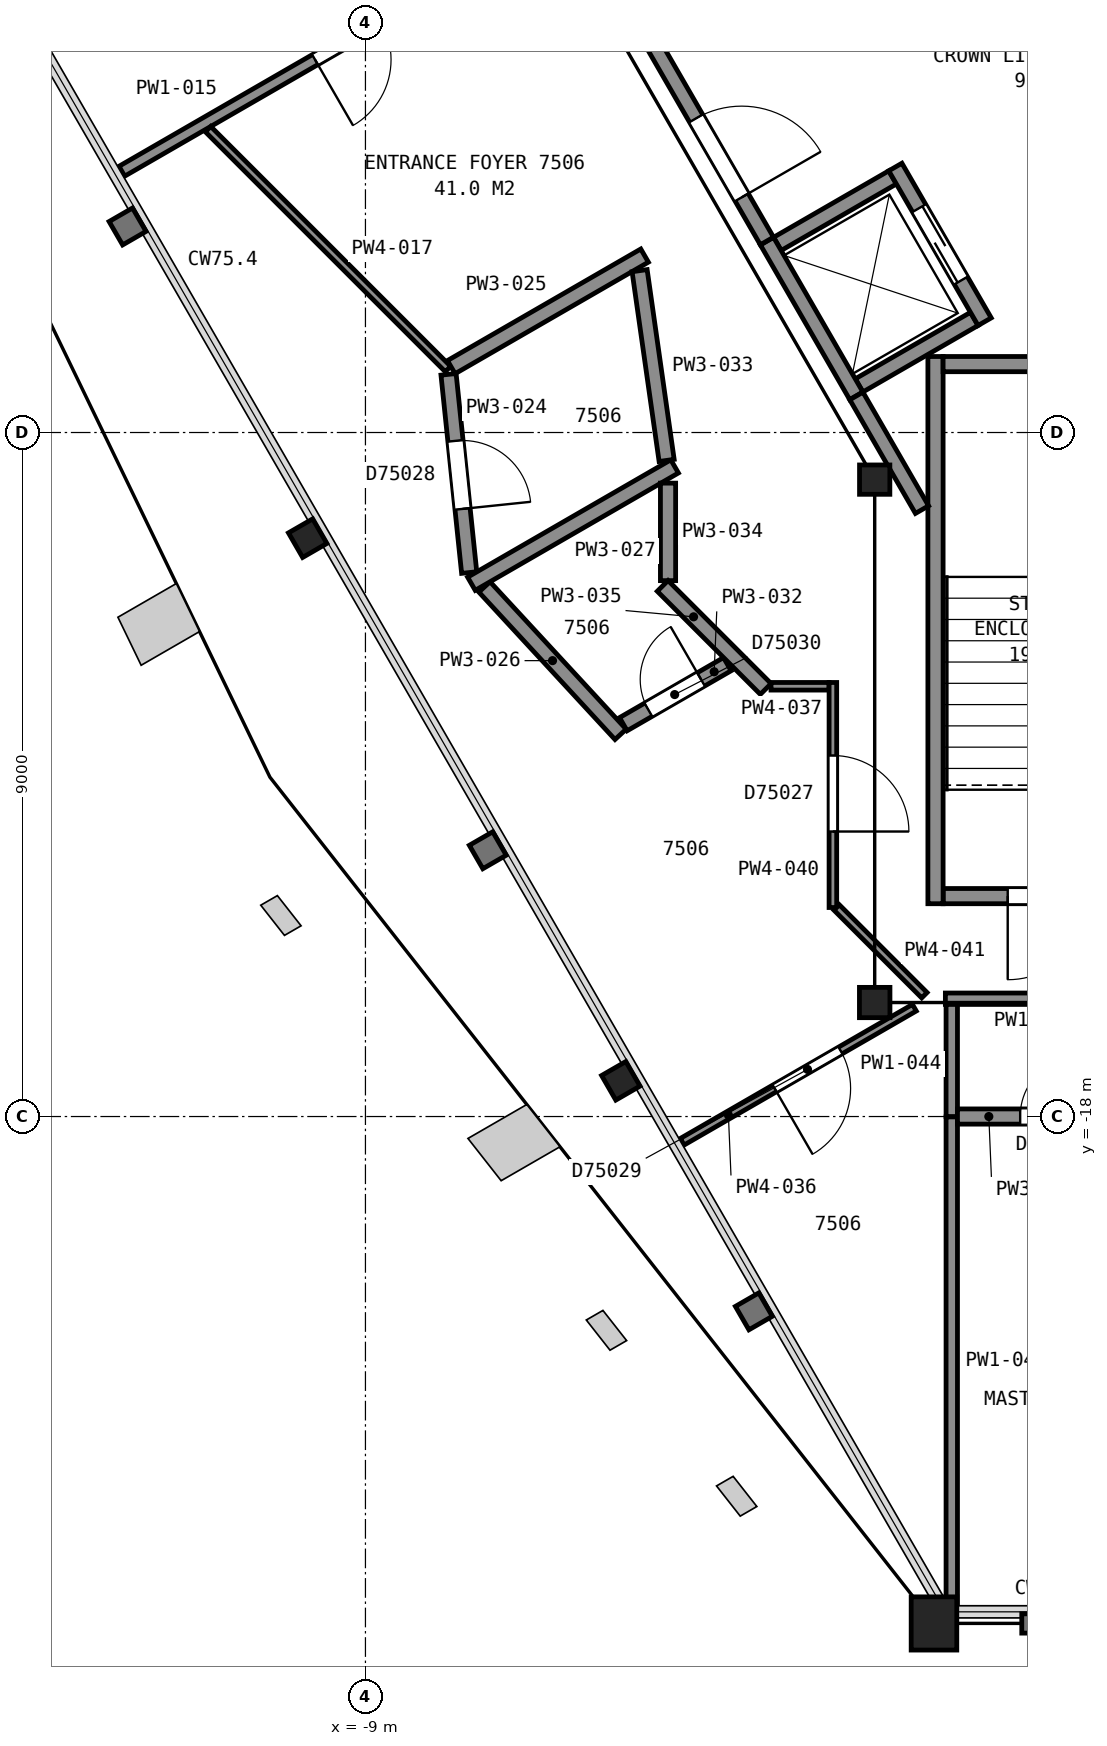
"""IFC4 building model, lengths in metres.
Left out: names, types, materials, properties, quantities, classifications, styles, units other than length and angle.
Written with IfcOpenShell. Run it as: python <this file> out.ifc"""

import sys

from ifc_helpers import new_model, si_unit, direction, frame, frame_2d, origin, origin_2d, place, context, subcontext, project, spatial, rectangle, hollow_rectangle, i_section, extrude, element, fill, save


model = new_model("IFC4")
c1 = context("Model", 3, precision=1e-05, world=origin(), true_north=direction((0.0, 1.0)))
c2 = subcontext(c1, "Body", "Model", "MODEL_VIEW")
j1 = project(units=[si_unit("LENGTHUNIT", "METRE"), si_unit("PLANEANGLEUNIT", "RADIAN")], contexts=[c1])
p1 = place(None, origin())
s1 = spatial("IfcSite", under=j1, at=p1, CompositionType="ELEMENT")
p2 = place(p1, origin())
s2 = spatial("IfcBuilding", under=s1, at=p2, CompositionType="ELEMENT")
p3 = place(p2, frame((0.0, 0.0, 297.3)))
s3 = spatial("IfcBuildingStorey", under=s2, at=p3, CompositionType="ELEMENT", Elevation=297.3)
for number, where, z_axis, x_axis in (
    (1, (-9.76, -10.39, 0.0), (0.0, 0.0, 1.0), (-0.5, 0.866, 0.0)),
    (2, (-5.64, -17.53, 0.0), (0.0, 0.0, 1.0), (-0.5, 0.866, 0.0)),
):
    element("IfcColumn", number, at=place(p3, frame(where, z_axis=z_axis, x_axis=x_axis)), inside=s3, PredefinedType="COLUMN", context=c2, shape_type="SweptSolid", body=[
        extrude(i_section(OverallWidth=0.373, OverallDepth=0.368, WebThickness=0.015, FlangeThickness=0.024, FilletRadius=0.015, at=origin_2d()), origin(), (0.0, 0.0, 1.0), 3.7),
    ])
p4 = place(p3, frame((-1.52, -24.67, 0.0), z_axis=(0.0, 0.0, 1.0), x_axis=(-1.0, 0.0, 0.0)))
e3 = element("IfcColumn", 3, at=p4, inside=s3, PredefinedType="COLUMN", context=c2, shape_type="SweptSolid", body=[
    extrude(hollow_rectangle(XDim=0.6, YDim=0.7, WallThickness=0.04, at=origin_2d()), origin(), (0.0, 0.0, 1.0), 3.7),
])
p5 = place(p3, frame((-2.3, -9.62, 0.0), z_axis=(0.0, 0.0, 1.0), x_axis=(1.0, 0.0, 0.0)))
e4 = element("IfcColumn", 4, at=p5, inside=s3, PredefinedType="COLUMN", context=c2, shape_type="SweptSolid", body=[
    extrude(i_section(OverallWidth=0.399, OverallDepth=0.386, WebThickness=0.021, FlangeThickness=0.033, FilletRadius=0.015, at=origin_2d()), origin(), (0.0, 0.0, 1.0), 3.7),
])
p6 = place(p3, frame((-2.3, -16.5, 0.0), z_axis=(0.0, 0.0, 1.0), x_axis=(-1.0, 0.0, 0.0)))
e5 = element("IfcColumn", 5, at=p6, inside=s3, PredefinedType="COLUMN", context=c2, shape_type="SweptSolid", body=[
    extrude(i_section(OverallWidth=0.401, OverallDepth=0.399, WebThickness=0.025, FlangeThickness=0.04, FilletRadius=0.015, at=origin_2d()), origin(), (0.0, 0.0, 1.0), 3.7),
])
p7 = place(p3, frame((-1.4, -15.1, 0.0), z_axis=(0.0, 0.0, 1.0), x_axis=(1.0, 0.0, 0.0)))
e6 = element("IfcWall", 6, at=p7, inside=s3, PredefinedType="PARTITIONING", context=c2, shape_type="SweptSolid", body=[
    extrude(rectangle(XDim=2.8, YDim=0.2, at=frame_2d((1.4, 0.0))), origin(), (0.0, 0.0, 1.0), 3.45),
])
p8 = place(p7, frame((0.85, 0.0, 0.0)))
e7 = element("IfcOpeningElement", 7, at=p8, cuts=e6, PredefinedType="OPENING", context=c2, shape_type="SweptSolid", body=[
    extrude(rectangle(XDim=1.1, YDim=2.1, at=frame_2d((0.55, 1.05))), frame((0.0, 0.11, 0.0), z_axis=(0.0, -1.0, 0.0), x_axis=(1.0, 0.0, 0.0)), (0.0, 0.0, 1.0), 0.22),
])
p9 = place(p3, frame((-1.5, -8.0, 0.0), z_axis=(0.0, 0.0, 1.0), x_axis=(0.0, -1.0, 0.0)))
e8 = element("IfcWall", 8, at=p9, inside=s3, PredefinedType="PARTITIONING", context=c2, shape_type="SweptSolid", body=[
    extrude(rectangle(XDim=7.2, YDim=0.2, at=frame_2d((3.6, 0.0))), origin(), (0.0, 0.0, 1.0), 3.45),
])
p10 = place(p3, frame((-1.4, -8.1, 0.0), z_axis=(0.0, 0.0, 1.0), x_axis=(1.0, 0.0, 0.0)))
e9 = element("IfcWall", 9, at=p10, inside=s3, PredefinedType="PARTITIONING", context=c2, shape_type="SweptSolid", body=[
    extrude(rectangle(XDim=2.8, YDim=0.2, at=frame_2d((1.4, 0.0))), origin(), (0.0, 0.0, 1.0), 3.45),
])
for number, where, z_axis, x_axis in (
    (10, (-2.505, -8.38, 0.0), (0.0, 0.0, 1.0), (0.866, 0.5, 0.0)),
    (11, (-3.58, -6.519, 0.0), (0.0, 0.0, 1.0), (0.866, 0.5, 0.0)),
):
    element("IfcWall", number, at=place(p3, frame(where, z_axis=z_axis, x_axis=x_axis)), inside=s3, PredefinedType="PARTITIONING", context=c2, shape_type="SweptSolid", body=[
        extrude(rectangle(XDim=1.75, YDim=0.2, at=frame_2d((0.875, 0.0))), origin(), (0.0, 0.0, 1.0), 3.7),
    ])
p11 = place(p3, frame((-0.853, -7.542, 0.0), z_axis=(0.0, 0.0, 1.0), x_axis=(-0.500016218704, 0.866016039709, 0.0)))
e12 = element("IfcWall", 12, at=p11, inside=s3, PredefinedType="PARTITIONING", context=c2, shape_type="SweptSolid", body=[
    extrude(rectangle(XDim=2.35, YDim=0.2, at=frame_2d((1.175, 0.0))), origin(), (0.0, 0.0, 1.0), 3.7),
])
p12 = place(p11, frame((0.625, 0.0, 0.0)))
e13 = element("IfcOpeningElement", 13, at=p12, cuts=e12, PredefinedType="OPENING", context=c2, shape_type="SweptSolid", body=[
    extrude(rectangle(XDim=1.1, YDim=2.1, at=frame_2d((0.55, 1.05))), frame((0.0, 0.11, 0.0), z_axis=(0.0, -1.0, 0.0), x_axis=(1.0, 0.0, 0.0)), (0.0, 0.0, 1.0), 0.22),
])
p13 = place(p3, frame((-2.542, -8.517, 0.0), z_axis=(0.0, 0.0, 1.0), x_axis=(-0.500016218704, 0.866016039709, 0.0)))
e14 = element("IfcWall", 14, at=p13, inside=s3, PredefinedType="PARTITIONING", context=c2, shape_type="SweptSolid", body=[
    extrude(rectangle(XDim=2.35, YDim=0.2, at=frame_2d((1.175, 0.0))), origin(), (0.0, 0.0, 1.0), 3.7),
])
p14 = place(p3, frame((-7.141, -0.551, 0.0), z_axis=(0.0, 0.0, 1.0), x_axis=(0.500001302854, -0.86602465158, 0.0)))
e15 = element("IfcWall", 15, at=p14, inside=s3, PredefinedType="PARTITIONING", context=c2, shape_type="SweptSolid", body=[
    extrude(rectangle(XDim=6.846, YDim=0.2, at=frame_2d((3.423, 0.0))), origin(), (0.0, 0.0, 1.0), 3.45),
])
p15 = place(p14, frame((4.983, 0.0, 0.0)))
e16 = element("IfcOpeningElement", 16, at=p15, cuts=e15, PredefinedType="OPENING", context=c2, shape_type="SweptSolid", body=[
    extrude(rectangle(XDim=1.2, YDim=2.1, at=frame_2d((0.6, 1.05))), frame((0.0, 0.11, 0.0), z_axis=(0.0, -1.0, 0.0), x_axis=(1.0, 0.0, 0.0)), (0.0, 0.0, 1.0), 0.22),
])
p16 = place(p3, frame((-2.541, -8.519, 0.0), z_axis=(0.0, 0.0, 1.0), x_axis=(0.500016142392, -0.86601608377, 0.0)))
e17 = element("IfcWall", 17, at=p16, inside=s3, PredefinedType="PARTITIONING", context=c2, shape_type="SweptSolid", body=[
    extrude(rectangle(XDim=1.727, YDim=0.2, at=frame_2d((0.864, 0.0))), origin(), (0.0, 0.0, 1.0), 3.45),
])
p17 = place(p3, frame((-12.205, -5.562, 0.0), z_axis=(0.0, 0.0, 1.0), x_axis=(0.866006351856, 0.500032997455, 0.0)))
e18 = element("IfcWall", 18, at=p17, inside=s3, PredefinedType="PARTITIONING", context=c2, shape_type="SweptSolid", body=[
    extrude(rectangle(XDim=5.671, YDim=0.15, at=frame_2d((2.835, 0.0))), origin(), (0.0, 0.0, 1.0), 2.723),
])
p18 = place(p17, frame((2.935, 0.0, 0.0)))
e19 = element("IfcOpeningElement", 19, at=p18, cuts=e18, PredefinedType="OPENING", context=c2, shape_type="SweptSolid", body=[
    extrude(rectangle(XDim=1.0, YDim=2.1, at=frame_2d((0.5, 1.05))), frame((0.0, 0.085, 0.0), z_axis=(0.0, -1.0, 0.0), x_axis=(1.0, 0.0, 0.0)), (0.0, 0.0, 1.0), 0.17),
])
p19 = place(p3, frame((-11.071, -5.008, 0.0), z_axis=(0.0, 0.0, 1.0), x_axis=(0.707079435951, -0.707134125365, 0.0)))
e20 = element("IfcWall", 20, at=p19, inside=s3, PredefinedType="PARTITIONING", context=c2, shape_type="SweptSolid", body=[
    extrude(rectangle(XDim=4.464, YDim=0.1, at=frame_2d((2.232, 0.0))), origin(), (0.0, 0.0, 1.0), 2.723),
])
p20 = place(p3, frame((-7.907, -8.235, 0.0), z_axis=(0.0, 0.0, 1.0), x_axis=(0.103623353624, -0.994616609847, 0.0)))
e21 = element("IfcWall", 21, at=p20, inside=s3, PredefinedType="PARTITIONING", context=c2, shape_type="SweptSolid", body=[
    extrude(rectangle(XDim=2.622, YDim=0.2, at=frame_2d((1.311, 0.0))), origin(), (0.0, 0.0, 1.0), 2.723),
])
p21 = place(p20, frame((0.88, 0.0, 0.0)))
e22 = element("IfcOpeningElement", 22, at=p21, cuts=e21, PredefinedType="OPENING", context=c2, shape_type="SweptSolid", body=[
    extrude(rectangle(XDim=0.9, YDim=2.1, at=frame_2d((0.45, 1.05))), frame((0.0, 0.11, 0.0), z_axis=(0.0, -1.0, 0.0), x_axis=(1.0, 0.0, 0.0)), (0.0, 0.0, 1.0), 0.22),
])
p22 = place(p3, frame((-7.871, -8.14, 0.0), z_axis=(0.0, 0.0, 1.0), x_axis=(0.866106676517, 0.49985920507, 0.0)))
e23 = element("IfcWall", 23, at=p22, inside=s3, PredefinedType="PARTITIONING", context=c2, shape_type="SweptSolid", body=[
    extrude(rectangle(XDim=2.936, YDim=0.2, at=frame_2d((1.468, 0.0))), origin(), (0.0, 0.0, 1.0), 2.723),
])
p23 = place(p3, frame((-7.434, -11.032, 0.0), z_axis=(0.0, 0.0, 1.0), x_axis=(0.678387636859, -0.734704167782, 0.0)))
e24 = element("IfcWall", 24, at=p23, inside=s3, PredefinedType="PARTITIONING", context=c2, shape_type="SweptSolid", body=[
    extrude(rectangle(XDim=2.64, YDim=0.2, at=frame_2d((1.32, 0.0))), origin(), (0.0, 0.0, 1.0), 2.723),
])
p24 = place(p3, frame((-7.606, -10.99, 0.0), z_axis=(0.0, 0.0, 1.0), x_axis=(0.865956409518, 0.500119482538, 0.0)))
e25 = element("IfcWall", 25, at=p24, inside=s3, PredefinedType="PARTITIONING", context=c2, shape_type="SweptSolid", body=[
    extrude(rectangle(XDim=3.087, YDim=0.2, at=frame_2d((1.543, 0.0))), origin(), (0.0, 0.0, 1.0), 2.723),
])
p25 = place(p3, frame((-5.607, -12.838, 0.0), z_axis=(0.0, 0.0, 1.0), x_axis=(0.866095534226, 0.499878510834, 0.0)))
e26 = element("IfcWall", 26, at=p25, inside=s3, PredefinedType="PARTITIONING", context=c2, shape_type="SweptSolid", body=[
    extrude(rectangle(XDim=1.58, YDim=0.2, at=frame_2d((0.79, 0.0))), origin(), (0.0, 0.0, 1.0), 2.723),
])
p26 = place(p25, frame((0.38, 0.0, 0.0)))
e27 = element("IfcOpeningElement", 27, at=p26, cuts=e26, PredefinedType="OPENING", context=c2, shape_type="SweptSolid", body=[
    extrude(rectangle(XDim=0.8, YDim=2.1, at=frame_2d((0.4, 1.05))), frame((0.0, 0.11, 0.0), z_axis=(0.0, -1.0, 0.0), x_axis=(1.0, 0.0, 0.0)), (0.0, 0.0, 1.0), 0.22),
])
p27 = place(p3, frame((-5.393, -6.871, 0.0), z_axis=(0.0, 0.0, 1.0), x_axis=(0.140960508483, -0.990015219604, 0.0)))
e28 = element("IfcWall", 28, at=p27, inside=s3, PredefinedType="PARTITIONING", context=c2, shape_type="SweptSolid", body=[
    extrude(rectangle(XDim=2.522, YDim=0.2, at=frame_2d((1.261, 0.0))), origin(), (0.0, 0.0, 1.0), 2.723),
])
p28 = place(p3, frame((-5.019, -10.949, 0.0), z_axis=(0.0, 0.0, 1.0), x_axis=(0.0, 1.0, 0.0)))
e29 = element("IfcWall", 29, at=p28, inside=s3, PredefinedType="PARTITIONING", context=c2, shape_type="SweptSolid", body=[
    extrude(rectangle(XDim=1.283, YDim=0.2, at=frame_2d((0.642, 0.0))), origin(), (0.0, 0.0, 1.0), 2.723),
])
p29 = place(p3, frame((-5.09, -11.018, 0.0), z_axis=(0.0, 0.0, 1.0), x_axis=(0.707106781187, -0.707106781187, 0.0)))
e30 = element("IfcWall", 30, at=p29, inside=s3, PredefinedType="PARTITIONING", context=c2, shape_type="SweptSolid", body=[
    extrude(rectangle(XDim=1.918, YDim=0.2, at=frame_2d((0.959, 0.0))), origin(), (0.0, 0.0, 1.0), 2.723),
])
p30 = place(p3, frame((-1.778, -16.568, 0.0), z_axis=(0.0, 0.0, 1.0), x_axis=(-0.866019606374, -0.500010041276, 0.0)))
e31 = element("IfcWall", 31, at=p30, inside=s3, PredefinedType="PARTITIONING", context=c2, shape_type="SweptSolid", body=[
    extrude(rectangle(XDim=3.527, YDim=0.1, at=frame_2d((1.764, 0.0))), origin(), (0.0, 0.0, 1.0), 2.723),
])
p31 = place(p30, frame((1.124, 0.0, 0.0)))
e32 = element("IfcOpeningElement", 32, at=p31, cuts=e31, PredefinedType="OPENING", context=c2, shape_type="SweptSolid", body=[
    extrude(rectangle(XDim=1.0, YDim=2.1, at=frame_2d((0.5, 1.05))), frame((0.0, 0.06, 0.0), z_axis=(0.0, -1.0, 0.0), x_axis=(1.0, 0.0, 0.0)), (0.0, 0.0, 1.0), 0.12),
])
p32 = place(p3, frame((-3.664, -12.339, 0.0), z_axis=(0.0, 0.0, 1.0), x_axis=(1.0, 0.0, 0.0)))
e33 = element("IfcWall", 33, at=p32, inside=s3, PredefinedType="PARTITIONING", context=c2, shape_type="SweptSolid", body=[
    extrude(rectangle(XDim=0.764, YDim=0.1, at=frame_2d((0.382, 0.0))), origin(), (0.0, 0.0, 1.0), 2.723),
])
p33 = place(p3, frame((-2.85, -15.25, 0.0), z_axis=(0.0, 0.0, 1.0), x_axis=(0.0, 1.0, 0.0)))
e34 = element("IfcWall", 34, at=p33, inside=s3, PredefinedType="PARTITIONING", context=c2, shape_type="SweptSolid", body=[
    extrude(rectangle(XDim=2.961, YDim=0.1, at=frame_2d((1.48, 0.0))), origin(), (0.0, 0.0, 1.0), 2.723),
])
p34 = place(p33, frame((1.0, 0.0, 0.0)))
e35 = element("IfcOpeningElement", 35, at=p34, cuts=e34, PredefinedType="OPENING", context=c2, shape_type="SweptSolid", body=[
    extrude(rectangle(XDim=1.0, YDim=2.1, at=frame_2d((0.5, 1.05))), frame((0.0, 0.06, 0.0), z_axis=(0.0, -1.0, 0.0), x_axis=(1.0, 0.0, 0.0)), (0.0, 0.0, 1.0), 0.12),
])
p35 = place(p3, frame((-2.801, -15.25, 0.0), z_axis=(0.0, 0.0, 1.0), x_axis=(0.707181547962, -0.707032006505, 0.0)))
e36 = element("IfcWall", 36, at=p35, inside=s3, PredefinedType="PARTITIONING", context=c2, shape_type="SweptSolid", body=[
    extrude(rectangle(XDim=1.633, YDim=0.1, at=frame_2d((0.816, 0.0))), origin(), (0.0, 0.0, 1.0), 2.723),
])
p36 = place(p3, frame((-1.37, -16.45, 0.0), z_axis=(0.0, 0.0, 1.0), x_axis=(1.0, 0.0, 0.0)))
e37 = element("IfcWall", 37, at=p36, inside=s3, PredefinedType="PARTITIONING", context=c2, shape_type="SweptSolid", body=[
    extrude(rectangle(XDim=2.345, YDim=0.15, at=frame_2d((1.173, 0.0))), origin(), (0.0, 0.0, 1.0), 2.723),
])
p37 = place(p3, frame((-1.286, -24.421, 0.0), z_axis=(0.0, 0.0, 1.0), x_axis=(0.0, 1.0, 0.0)))
e38 = element("IfcWall", 38, at=p37, inside=s3, PredefinedType="PARTITIONING", context=c2, shape_type="SweptSolid", body=[
    extrude(rectangle(XDim=6.416, YDim=0.15, at=frame_2d((3.208, 0.0))), origin(), (0.0, 0.0, 1.0), 2.723),
])
p38 = place(p3, frame((-1.286, -18.0, 0.0), z_axis=(0.0, 0.0, 1.0), x_axis=(0.0, 1.0, 0.0)))
e39 = element("IfcWall", 39, at=p38, inside=s3, PredefinedType="PARTITIONING", context=c2, shape_type="SweptSolid", body=[
    extrude(rectangle(XDim=1.475, YDim=0.15, at=frame_2d((0.738, 0.0))), origin(), (0.0, 0.0, 1.0), 2.723),
])
p39 = place(p3, frame((-1.211, -18.0, 0.0), z_axis=(0.0, 0.0, 1.0), x_axis=(1.0, 0.0, 0.0)))
e40 = element("IfcWall", 40, at=p39, inside=s3, PredefinedType="PARTITIONING", context=c2, shape_type="SweptSolid", body=[
    extrude(rectangle(XDim=2.411, YDim=0.2, at=frame_2d((1.206, 0.0))), origin(), (0.0, 0.0, 1.0), 2.723),
])
p40 = place(p39, frame((0.825, 0.0, 0.0)))
e41 = element("IfcOpeningElement", 41, at=p40, cuts=e40, PredefinedType="OPENING", context=c2, shape_type="SweptSolid", body=[
    extrude(rectangle(XDim=0.8, YDim=2.1, at=frame_2d((0.4, 1.05))), frame((0.0, 0.11, 0.0), z_axis=(0.0, -1.0, 0.0), x_axis=(1.0, 0.0, 0.0)), (0.0, 0.0, 1.0), 0.22),
])
p41 = place(p8, origin())
e42 = element("IfcDoor", 42, at=p41, inside=s3, OperationType="SINGLE_SWING_LEFT", PredefinedType="DOOR", context=c2, shape_type="SweptSolid", body=[
    extrude(rectangle(XDim=1.1, YDim=2.1, at=frame_2d((0.55, 1.05))), frame((0.0, 0.025, 0.0), z_axis=(0.0, -1.0, 0.0), x_axis=(1.0, 0.0, 0.0)), (0.0, 0.0, 1.0), 0.05),
])
fill(e7, e42)
p42 = place(p12, origin())
e43 = element("IfcDoor", 43, at=p42, inside=s3, OperationType="SLIDING_TO_LEFT", PredefinedType="DOOR", context=c2, shape_type="SweptSolid", body=[
    extrude(rectangle(XDim=1.1, YDim=2.1, at=frame_2d((0.55, 1.05))), frame((0.0, 0.025, 0.0), z_axis=(0.0, -1.0, 0.0), x_axis=(1.0, 0.0, 0.0)), (0.0, 0.0, 1.0), 0.05),
])
fill(e13, e43)
p43 = place(p15, origin())
e44 = element("IfcDoor", 44, at=p43, inside=s3, OperationType="SINGLE_SWING_RIGHT", PredefinedType="DOOR", context=c2, shape_type="SweptSolid", body=[
    extrude(rectangle(XDim=1.2, YDim=2.1, at=frame_2d((0.6, 1.05))), frame((0.0, 0.025, 0.0), z_axis=(0.0, -1.0, 0.0), x_axis=(1.0, 0.0, 0.0)), (0.0, 0.0, 1.0), 0.05),
])
fill(e16, e44)
p44 = place(p18, origin())
e45 = element("IfcDoor", 45, at=p44, inside=s3, OperationType="SINGLE_SWING_LEFT", PredefinedType="DOOR", context=c2, shape_type="SweptSolid", body=[
    extrude(rectangle(XDim=1.0, YDim=2.1, at=frame_2d((0.5, 1.05))), frame((0.0, 0.025, 0.0), z_axis=(0.0, -1.0, 0.0), x_axis=(1.0, 0.0, 0.0)), (0.0, 0.0, 1.0), 0.05),
])
fill(e19, e45)
p45 = place(p21, origin())
e46 = element("IfcDoor", 46, at=p45, inside=s3, OperationType="SINGLE_SWING_RIGHT", PredefinedType="DOOR", context=c2, shape_type="SweptSolid", body=[
    extrude(rectangle(XDim=0.9, YDim=2.1, at=frame_2d((0.45, 1.05))), frame((0.0, 0.025, 0.0), z_axis=(0.0, -1.0, 0.0), x_axis=(1.0, 0.0, 0.0)), (0.0, 0.0, 1.0), 0.05),
])
fill(e22, e46)
p46 = place(p26, origin())
e47 = element("IfcDoor", 47, at=p46, inside=s3, OperationType="SINGLE_SWING_RIGHT", PredefinedType="DOOR", context=c2, shape_type="SweptSolid", body=[
    extrude(rectangle(XDim=0.8, YDim=2.1, at=frame_2d((0.4, 1.05))), frame((0.0, 0.025, 0.0), z_axis=(0.0, -1.0, 0.0), x_axis=(1.0, 0.0, 0.0)), (0.0, 0.0, 1.0), 0.05),
])
fill(e27, e47)
p47 = place(p31, origin())
e48 = element("IfcDoor", 48, at=p47, inside=s3, OperationType="SINGLE_SWING_RIGHT", PredefinedType="DOOR", context=c2, shape_type="SweptSolid", body=[
    extrude(rectangle(XDim=1.0, YDim=2.1, at=frame_2d((0.5, 1.05))), frame((0.0, 0.025, 0.0), z_axis=(0.0, -1.0, 0.0), x_axis=(1.0, 0.0, 0.0)), (0.0, 0.0, 1.0), 0.05),
])
fill(e32, e48)
p48 = place(p34, origin())
e49 = element("IfcDoor", 49, at=p48, inside=s3, OperationType="SINGLE_SWING_LEFT", PredefinedType="DOOR", context=c2, shape_type="SweptSolid", body=[
    extrude(rectangle(XDim=1.0, YDim=2.1, at=frame_2d((0.5, 1.05))), frame((0.0, 0.025, 0.0), z_axis=(0.0, -1.0, 0.0), x_axis=(1.0, 0.0, 0.0)), (0.0, 0.0, 1.0), 0.05),
])
fill(e35, e49)
p49 = place(p40, origin())
e50 = element("IfcDoor", 50, at=p49, inside=s3, OperationType="SINGLE_SWING_RIGHT", PredefinedType="DOOR", context=c2, shape_type="SweptSolid", body=[
    extrude(rectangle(XDim=0.8, YDim=2.1, at=frame_2d((0.4, 1.05))), frame((0.0, 0.025, 0.0), z_axis=(0.0, -1.0, 0.0), x_axis=(1.0, 0.0, 0.0)), (0.0, 0.0, 1.0), 0.05),
])
fill(e41, e50)
save(model, sys.argv[1])
